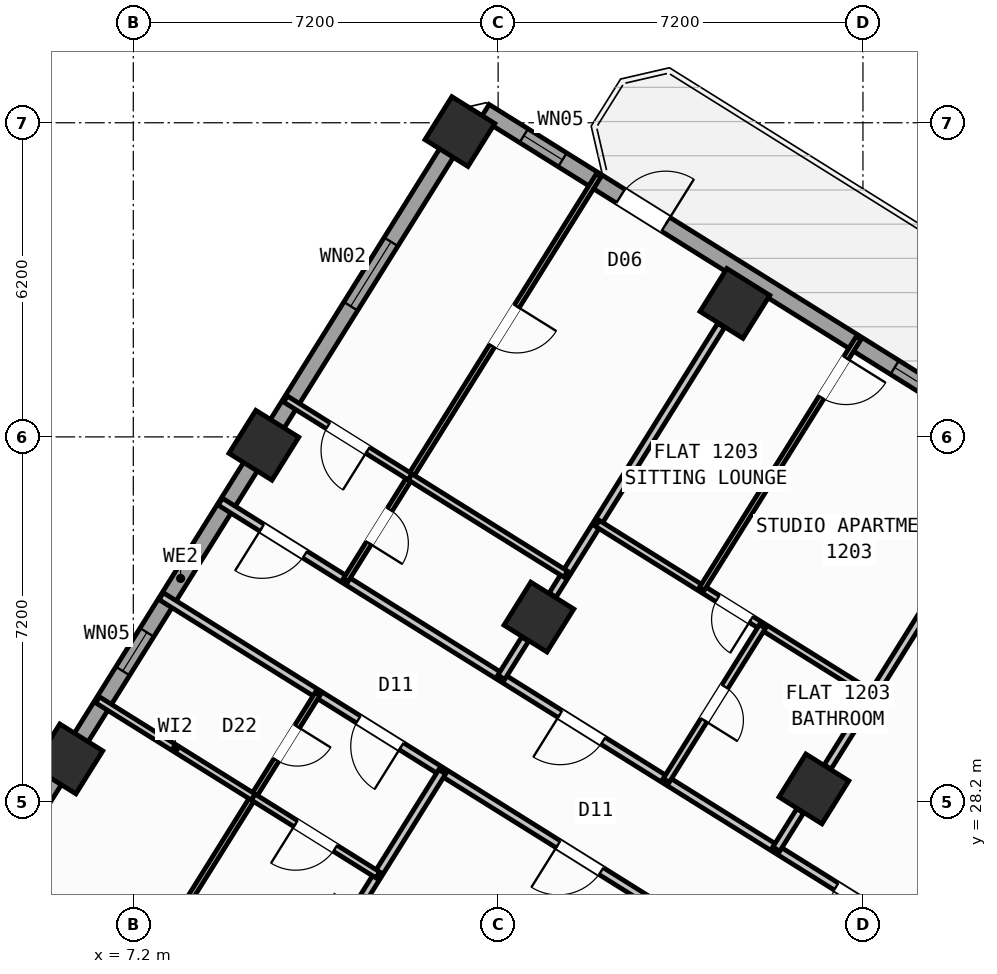
"""IFC4 building model, lengths in metres.
Left out: names, types, materials, properties, quantities, classifications, styles, units other than length and angle.
Written with IfcOpenShell. Run it as: python <this file> out.ifc"""

import sys

from ifc_helpers import new_model, si_unit, direction, frame, frame_2d, origin, origin_2d, place, context, subcontext, project, spatial, rectangle, hollow_rectangle, extrude, source, transform, mapped, element, fill, save


model = new_model("IFC4")
c1 = context("Model", 3, precision=1e-05, world=origin(), true_north=direction((0.0, 1.0)))
c2 = subcontext(c1, "Body", "Model", "MODEL_VIEW")
j1 = project(units=[si_unit("LENGTHUNIT", "METRE"), si_unit("PLANEANGLEUNIT", "RADIAN")], contexts=[c1])
p1 = place(None, origin())
s1 = spatial("IfcSite", under=j1, at=p1, CompositionType="ELEMENT")
p2 = place(p1, origin())
s2 = spatial("IfcBuilding", under=s1, at=p2, CompositionType="ELEMENT")
p3 = place(p2, frame((0.0, 0.0, 49.2)))
s3 = spatial("IfcBuildingStorey", under=s2, at=p3, CompositionType="ELEMENT", Elevation=49.2)
m1 = source(origin(), c2, "Body", "SweptSolid", [
    extrude(hollow_rectangle(XDim=1.0, YDim=1.0, WallThickness=0.04, at=origin_2d()), origin(), (0.0, 0.0, 1.0), 3.6),
])
for number, where, z_axis, x_axis in (
    (1, (20.632, 28.452, 0.0), (0.0, 0.0, 1.0), (-0.848, 0.53, 0.0)),
    (2, (19.073, 38.034, 0.0), (0.0, 0.0, 1.0), (-0.848, 0.53, 0.0)),
    (3, (15.205, 31.844, 0.0), (0.0, 0.0, 1.0), (-0.848, 0.53, 0.0)),
    (4, (13.646, 41.426, 0.0), (0.0, 0.0, 1.0), (-0.848, 0.53, 0.0)),
    (5, (9.777, 35.235, 0.0), (0.0, 0.0, 1.0), (-0.848, 0.53, 0.0)),
    (6, (5.909, 29.044, 0.0), (0.0, 0.0, 1.0), (-0.848, 0.53, 0.0)),
):
    element("IfcColumn", number, at=place(p3, frame(where, z_axis=z_axis, x_axis=x_axis)), inside=s3, PredefinedType="COLUMN", context=c2, shape_type="MappedRepresentation", body=[
        mapped(m1, transform((0.0, 0.0, 0.0), scale=1.0)),
    ])
p4 = place(p3, frame((2.415, 23.452, 0.0), z_axis=(0.0, 0.0, 1.0), x_axis=(0.52991049553, 0.848053575387, 0.0)))
e7 = element("IfcWall", 7, at=p4, inside=s3, PredefinedType="STANDARD", context=c2, shape_type="SweptSolid", body=[
    extrude(rectangle(XDim=21.587, YDim=0.32, at=frame_2d((10.794, 0.0))), origin(), (0.0, 0.0, 1.0), 2.725),
])
p5 = place(p4, frame((2.356, 0.0, 0.8)))
e8 = element("IfcOpeningElement", 8, at=p5, cuts=e7, PredefinedType="OPENING", context=c2, shape_type="SweptSolid", body=[
    extrude(rectangle(XDim=2.1, YDim=1.55, at=frame_2d((1.05, 0.775))), frame((0.0, 0.17, 0.0), z_axis=(0.0, -1.0, 0.0), x_axis=(1.0, 0.0, 0.0)), (0.0, 0.0, 1.0), 0.34),
])
p6 = place(p4, frame((8.639, 0.0, 1.0)))
e9 = element("IfcOpeningElement", 9, at=p6, cuts=e7, PredefinedType="OPENING", context=c2, shape_type="SweptSolid", body=[
    extrude(rectangle(XDim=0.9, YDim=1.25, at=frame_2d((0.45, 0.625))), frame((0.0, 0.17, 0.0), z_axis=(0.0, -1.0, 0.0), x_axis=(1.0, 0.0, 0.0)), (0.0, 0.0, 1.0), 0.34),
])
p7 = place(p4, frame((17.129, 0.0, 0.85)))
e10 = element("IfcOpeningElement", 10, at=p7, cuts=e7, PredefinedType="OPENING", context=c2, shape_type="SweptSolid", body=[
    extrude(rectangle(XDim=1.5, YDim=1.5, at=frame_2d((0.75, 0.75))), frame((0.0, 0.17, 0.0), z_axis=(0.0, -1.0, 0.0), x_axis=(1.0, 0.0, 0.0)), (0.0, 0.0, 1.0), 0.34),
])
p8 = place(p3, frame((14.138, 41.825, 0.0), z_axis=(0.0, 0.0, 1.0), x_axis=(0.848046498049, -0.529921821731, 0.0)))
e11 = element("IfcWall", 11, at=p8, inside=s3, PredefinedType="STANDARD", context=c2, shape_type="SweptSolid", body=[
    extrude(rectangle(XDim=31.588, YDim=0.32, at=frame_2d((15.794, 0.0))), origin(), (0.0, 0.0, 1.0), 3.35),
])
p9 = place(p8, frame((3.159, 0.0, 0.0)))
e12 = element("IfcOpeningElement", 12, at=p9, cuts=e11, PredefinedType="OPENING", context=c2, shape_type="SweptSolid", body=[
    extrude(rectangle(XDim=1.05, YDim=2.15, at=frame_2d((0.525, 1.075))), frame((0.0, 0.17, 0.0), z_axis=(0.0, -1.0, 0.0), x_axis=(1.0, 0.0, 0.0)), (0.0, 0.0, 1.0), 0.34),
])
p10 = place(p8, frame((0.906, 0.0, 1.0)))
e13 = element("IfcOpeningElement", 13, at=p10, cuts=e11, PredefinedType="OPENING", context=c2, shape_type="SweptSolid", body=[
    extrude(rectangle(XDim=0.9, YDim=1.25, at=frame_2d((0.45, 0.625))), frame((0.0, 0.17, 0.0), z_axis=(0.0, -1.0, 0.0), x_axis=(1.0, 0.0, 0.0)), (0.0, 0.0, 1.0), 0.34),
])
p11 = place(p8, frame((9.537, 0.0, 0.85)))
e14 = element("IfcOpeningElement", 14, at=p11, cuts=e11, PredefinedType="OPENING", context=c2, shape_type="SweptSolid", body=[
    extrude(rectangle(XDim=1.8, YDim=1.5, at=frame_2d((0.9, 0.75))), frame((0.0, 0.17, 0.0), z_axis=(0.0, -1.0, 0.0), x_axis=(1.0, 0.0, 0.0)), (0.0, 0.0, 1.0), 0.34),
])
p12 = place(p8, frame((13.899, 0.0, 0.85)))
e15 = element("IfcOpeningElement", 15, at=p12, cuts=e11, PredefinedType="OPENING", context=c2, shape_type="SweptSolid", body=[
    extrude(rectangle(XDim=1.5, YDim=1.5, at=frame_2d((0.75, 0.75))), frame((0.0, 0.17, 0.0), z_axis=(0.0, -1.0, 0.0), x_axis=(1.0, 0.0, 0.0)), (0.0, 0.0, 1.0), 0.34),
])
p13 = place(p8, frame((22.019, 0.0, 0.95)))
e16 = element("IfcOpeningElement", 16, at=p13, cuts=e11, PredefinedType="OPENING", context=c2, shape_type="SweptSolid", body=[
    extrude(rectangle(XDim=1.2, YDim=1.4, at=frame_2d((0.6, 0.7))), frame((0.0, 0.17, 0.0), z_axis=(0.0, -1.0, 0.0), x_axis=(1.0, 0.0, 0.0)), (0.0, 0.0, 1.0), 0.34),
])
p14 = place(p8, frame((27.569, 0.0, 0.95)))
e17 = element("IfcOpeningElement", 17, at=p14, cuts=e11, PredefinedType="OPENING", context=c2, shape_type="SweptSolid", body=[
    extrude(rectangle(XDim=1.2, YDim=1.4, at=frame_2d((0.6, 0.7))), frame((0.0, 0.17, 0.0), z_axis=(0.0, -1.0, 0.0), x_axis=(1.0, 0.0, 0.0)), (0.0, 0.0, 1.0), 0.34),
])
p15 = place(p3, frame((23.104, 25.256, 0.0), z_axis=(0.0, 0.0, 1.0), x_axis=(-0.848041752158, 0.529929416617, 0.0)))
e18 = element("IfcWall", 18, at=p15, inside=s3, PredefinedType="PARTITIONING", context=c2, shape_type="SweptSolid", body=[
    extrude(rectangle(XDim=16.73, YDim=0.16, at=frame_2d((8.365, 0.0))), origin(), (0.0, 0.0, 1.0), 3.34),
])
p16 = place(p15, frame((1.395, 0.0, 0.0)))
e19 = element("IfcOpeningElement", 19, at=p16, cuts=e18, PredefinedType="OPENING", context=c2, shape_type="SweptSolid", body=[
    extrude(rectangle(XDim=1.0, YDim=2.1, at=frame_2d((0.5, 1.05))), frame((0.0, 0.09, 0.0), z_axis=(0.0, -1.0, 0.0), x_axis=(1.0, 0.0, 0.0)), (0.0, 0.0, 1.0), 0.18),
])
p17 = place(p15, frame((7.82, 0.0, 0.0)))
e20 = element("IfcOpeningElement", 20, at=p17, cuts=e18, PredefinedType="OPENING", context=c2, shape_type="SweptSolid", body=[
    extrude(rectangle(XDim=1.0, YDim=2.1, at=frame_2d((0.5, 1.05))), frame((0.0, 0.09, 0.0), z_axis=(0.0, -1.0, 0.0), x_axis=(1.0, 0.0, 0.0)), (0.0, 0.0, 1.0), 0.18),
])
p18 = place(p15, frame((14.76, 0.0, 0.0)))
e21 = element("IfcOpeningElement", 21, at=p18, cuts=e18, PredefinedType="OPENING", context=c2, shape_type="SweptSolid", body=[
    extrude(rectangle(XDim=1.0, YDim=2.1, at=frame_2d((0.5, 1.05))), frame((0.0, 0.09, 0.0), z_axis=(0.0, -1.0, 0.0), x_axis=(1.0, 0.0, 0.0)), (0.0, 0.0, 1.0), 0.18),
])
p19 = place(p3, frame((21.938, 23.391, 0.0), z_axis=(0.0, 0.0, 1.0), x_axis=(-0.848045850158, 0.529922858565, 0.0)))
e22 = element("IfcWall", 22, at=p19, inside=s3, PredefinedType="PARTITIONING", context=c2, shape_type="SweptSolid", body=[
    extrude(rectangle(XDim=16.73, YDim=0.16, at=frame_2d((8.365, 0.0))), origin(), (0.0, 0.0, 1.0), 3.34),
])
p20 = place(p19, frame((2.22, 0.0, 0.0)))
e23 = element("IfcOpeningElement", 23, at=p20, cuts=e22, PredefinedType="OPENING", context=c2, shape_type="SweptSolid", body=[
    extrude(rectangle(XDim=0.86, YDim=2.05, at=frame_2d((0.43, 1.025))), frame((0.0, 0.09, 0.0), z_axis=(0.0, -1.0, 0.0), x_axis=(1.0, 0.0, 0.0)), (0.0, 0.0, 1.0), 0.18),
])
p21 = place(p19, frame((6.49, 0.0, 0.0)))
e24 = element("IfcOpeningElement", 24, at=p21, cuts=e22, PredefinedType="OPENING", context=c2, shape_type="SweptSolid", body=[
    extrude(rectangle(XDim=1.0, YDim=2.1, at=frame_2d((0.5, 1.05))), frame((0.0, 0.09, 0.0), z_axis=(0.0, -1.0, 0.0), x_axis=(1.0, 0.0, 0.0)), (0.0, 0.0, 1.0), 0.18),
])
p22 = place(p19, frame((11.14, 0.0, 0.0)))
e25 = element("IfcOpeningElement", 25, at=p22, cuts=e22, PredefinedType="OPENING", context=c2, shape_type="SweptSolid", body=[
    extrude(rectangle(XDim=1.0, YDim=2.1, at=frame_2d((0.5, 1.05))), frame((0.0, 0.09, 0.0), z_axis=(0.0, -1.0, 0.0), x_axis=(1.0, 0.0, 0.0)), (0.0, 0.0, 1.0), 0.18),
])
p23 = place(p3, frame((13.297, 28.791, 0.0), z_axis=(0.0, 0.0, 1.0), x_axis=(-0.529930102756, -0.848041323399, 0.0)))
e26 = element("IfcWall", 26, at=p23, inside=s3, PredefinedType="PARTITIONING", context=c2, shape_type="SweptSolid", body=[
    extrude(rectangle(XDim=3.188, YDim=0.16, at=frame_2d((1.594, 0.0))), origin(), (0.0, 0.0, 1.0), 2.725),
])
p24 = place(p3, frame((10.837, 30.327, 0.0), z_axis=(0.0, 0.0, 1.0), x_axis=(-0.529912148489, -0.848052542525, 0.0)))
e27 = element("IfcWall", 27, at=p24, inside=s3, PredefinedType="PARTITIONING", context=c2, shape_type="SweptSolid", body=[
    extrude(rectangle(XDim=10.62, YDim=0.11, at=frame_2d((5.31, 0.0))), origin(), (0.0, 0.0, 1.0), 3.34),
])
p25 = place(p24, frame((0.76, 0.0, 0.0)))
e28 = element("IfcOpeningElement", 28, at=p25, cuts=e27, PredefinedType="OPENING", context=c2, shape_type="SweptSolid", body=[
    extrude(rectangle(XDim=0.78, YDim=2.05, at=frame_2d((0.39, 1.025))), frame((0.0, 0.065, 0.0), z_axis=(0.0, -1.0, 0.0), x_axis=(1.0, 0.0, 0.0)), (0.0, 0.0, 1.0), 0.13),
])
p26 = place(p24, frame((6.05, 0.0, 0.0)))
e29 = element("IfcOpeningElement", 29, at=p26, cuts=e27, PredefinedType="OPENING", context=c2, shape_type="SweptSolid", body=[
    extrude(rectangle(XDim=0.92, YDim=2.08, at=frame_2d((0.46, 1.04))), frame((0.0, 0.065, 0.0), z_axis=(0.0, -1.0, 0.0), x_axis=(1.0, 0.0, 0.0)), (0.0, 0.0, 1.0), 0.13),
])
p27 = place(p3, frame((12.025, 26.755, 0.0), z_axis=(0.0, 0.0, 1.0), x_axis=(-0.848059786386, 0.529900555496, 0.0)))
e30 = element("IfcWall", 30, at=p27, inside=s3, PredefinedType="PLUMBINGWALL", context=c2, shape_type="SweptSolid", body=[
    extrude(rectangle(XDim=2.9, YDim=0.14, at=frame_2d((1.45, 0.0))), origin(), (0.0, 0.0, 1.0), 3.34),
])
p28 = place(p27, frame((0.99, 0.0, 0.0)))
e31 = element("IfcOpeningElement", 31, at=p28, cuts=e30, PredefinedType="OPENING", context=c2, shape_type="SweptSolid", body=[
    extrude(rectangle(XDim=0.92, YDim=2.08, at=frame_2d((0.46, 1.04))), frame((0.0, 0.08, 0.0), z_axis=(0.0, -1.0, 0.0), x_axis=(1.0, 0.0, 0.0)), (0.0, 0.0, 1.0), 0.16),
])
p29 = place(p3, frame((9.566, 28.292, 0.0), z_axis=(0.0, 0.0, 1.0), x_axis=(-0.848021036626, 0.529962566074, 0.0)))
e32 = element("IfcWall", 32, at=p29, inside=s3, PredefinedType="PLUMBINGWALL", context=c2, shape_type="SweptSolid", body=[
    extrude(rectangle(XDim=3.62, YDim=0.14, at=frame_2d((1.81, 0.0))), origin(), (0.0, 0.0, 1.0), 3.34),
])
p30 = place(p3, frame((24.229, 34.209, 0.0), z_axis=(0.0, 0.0, 1.0), x_axis=(-0.529897533635, -0.848061674554, 0.0)))
e33 = element("IfcWall", 33, at=p30, inside=s3, PredefinedType="PARTITIONING", context=c2, shape_type="SweptSolid", body=[
    extrude(rectangle(XDim=6.276, YDim=0.16, at=frame_2d((3.138, 0.0))), origin(), (0.0, 0.0, 1.0), 2.725),
])
p31 = place(p3, frame((20.361, 28.018, 0.0), z_axis=(0.0, 0.0, 1.0), x_axis=(-0.529900064649, -0.848060093086, 0.0)))
e34 = element("IfcWall", 34, at=p31, inside=s3, PredefinedType="PARTITIONING", context=c2, shape_type="SweptSolid", body=[
    extrude(rectangle(XDim=0.888, YDim=0.16, at=frame_2d((0.444, 0.0))), origin(), (0.0, 0.0, 1.0), 2.725),
])
p32 = place(p3, frame((18.802, 37.6, 0.0), z_axis=(0.0, 0.0, 1.0), x_axis=(-0.529915015264, -0.848050751193, 0.0)))
e35 = element("IfcWall", 35, at=p32, inside=s3, PredefinedType="PARTITIONING", context=c2, shape_type="SweptSolid", body=[
    extrude(rectangle(XDim=6.276, YDim=0.16, at=frame_2d((3.138, 0.0))), origin(), (0.0, 0.0, 1.0), 2.725),
])
p33 = place(p3, frame((14.933, 31.409, 0.0), z_axis=(0.0, 0.0, 1.0), x_axis=(-0.529776512202, -0.848137280821, 0.0)))
e36 = element("IfcWall", 36, at=p33, inside=s3, PredefinedType="PARTITIONING", context=c2, shape_type="SweptSolid", body=[
    extrude(rectangle(XDim=0.888, YDim=0.16, at=frame_2d((0.444, 0.0))), origin(), (0.0, 0.0, 1.0), 2.725),
])
p34 = place(p3, frame((21.787, 30.301, 0.0), z_axis=(0.0, 0.0, 1.0), x_axis=(-0.848049732085, 0.529916646191, 0.0)))
e37 = element("IfcWall", 37, at=p34, inside=s3, PredefinedType="PLUMBINGWALL", context=c2, shape_type="SweptSolid", body=[
    extrude(rectangle(XDim=6.4, YDim=0.14, at=frame_2d((3.2, 0.0))), origin(), (0.0, 0.0, 1.0), 3.34),
])
p35 = place(p34, frame((2.824, 0.0, 0.0)))
e38 = element("IfcOpeningElement", 38, at=p35, cuts=e37, PredefinedType="OPENING", context=c2, shape_type="SweptSolid", body=[
    extrude(rectangle(XDim=0.78, YDim=2.05, at=frame_2d((0.39, 1.025))), frame((0.0, 0.08, 0.0), z_axis=(0.0, -1.0, 0.0), x_axis=(1.0, 0.0, 0.0)), (0.0, 0.0, 1.0), 0.16),
])
p36 = place(p3, frame((19.616, 31.657, 0.0), z_axis=(0.0, 0.0, 1.0), x_axis=(-0.529876336437, -0.84807491891, 0.0)))
e39 = element("IfcWall", 39, at=p36, inside=s3, PredefinedType="PLUMBINGWALL", context=c2, shape_type="SweptSolid", body=[
    extrude(rectangle(XDim=3.58, YDim=0.14, at=frame_2d((1.79, 0.0))), origin(), (0.0, 0.0, 1.0), 3.34),
])
p37 = place(p36, frame((1.4, 0.0, 0.0)))
e40 = element("IfcOpeningElement", 40, at=p37, cuts=e39, PredefinedType="OPENING", context=c2, shape_type="SweptSolid", body=[
    extrude(rectangle(XDim=0.78, YDim=2.05, at=frame_2d((0.39, 1.025))), frame((0.0, 0.08, 0.0), z_axis=(0.0, -1.0, 0.0), x_axis=(1.0, 0.0, 0.0)), (0.0, 0.0, 1.0), 0.16),
])
p38 = place(p3, frame((21.517, 37.356, 0.0), z_axis=(0.0, 0.0, 1.0), x_axis=(-0.529916267533, -0.848049968695, 0.0)))
e41 = element("IfcWall", 41, at=p38, inside=s3, PredefinedType="PARTITIONING", context=c2, shape_type="SweptSolid", body=[
    extrude(rectangle(XDim=5.84, YDim=0.11, at=frame_2d((2.92, 0.0))), origin(), (0.0, 0.0, 1.0), 3.34),
])
p39 = place(p38, frame((0.47, 0.0, 0.0)))
e42 = element("IfcOpeningElement", 42, at=p39, cuts=e41, PredefinedType="OPENING", context=c2, shape_type="SweptSolid", body=[
    extrude(rectangle(XDim=0.92, YDim=2.08, at=frame_2d((0.46, 1.04))), frame((0.0, 0.065, 0.0), z_axis=(0.0, -1.0, 0.0), x_axis=(1.0, 0.0, 0.0)), (0.0, 0.0, 1.0), 0.13),
])
p40 = place(p3, frame((16.385, 40.563, 0.0), z_axis=(0.0, 0.0, 1.0), x_axis=(-0.529931378574, -0.848040526156, 0.0)))
e43 = element("IfcWall", 43, at=p40, inside=s3, PredefinedType="PARTITIONING", context=c2, shape_type="SweptSolid", body=[
    extrude(rectangle(XDim=9.42, YDim=0.11, at=frame_2d((4.71, 0.0))), origin(), (0.0, 0.0, 1.0), 3.34),
])
p41 = place(p40, frame((7.78, 0.0, 0.0)))
e44 = element("IfcOpeningElement", 44, at=p41, cuts=e43, PredefinedType="OPENING", context=c2, shape_type="SweptSolid", body=[
    extrude(rectangle(XDim=0.78, YDim=2.05, at=frame_2d((0.39, 1.025))), frame((0.0, 0.065, 0.0), z_axis=(0.0, -1.0, 0.0), x_axis=(1.0, 0.0, 0.0)), (0.0, 0.0, 1.0), 0.13),
])
p42 = place(p40, frame((3.05, 0.0, 0.0)))
e45 = element("IfcOpeningElement", 45, at=p42, cuts=e43, PredefinedType="OPENING", context=c2, shape_type="SweptSolid", body=[
    extrude(rectangle(XDim=0.92, YDim=2.08, at=frame_2d((0.46, 1.04))), frame((0.0, 0.065, 0.0), z_axis=(0.0, -1.0, 0.0), x_axis=(1.0, 0.0, 0.0)), (0.0, 0.0, 1.0), 0.13),
])
p43 = place(p3, frame((12.665, 34.61, 0.0), z_axis=(0.0, 0.0, 1.0), x_axis=(-0.848045593671, 0.529923269025, 0.0)))
e46 = element("IfcWall", 46, at=p43, inside=s3, PredefinedType="PLUMBINGWALL", context=c2, shape_type="SweptSolid", body=[
    extrude(rectangle(XDim=2.9, YDim=0.14, at=frame_2d((1.45, 0.0))), origin(), (0.0, 0.0, 1.0), 3.34),
])
p44 = place(p43, frame((0.99, 0.0, 0.0)))
e47 = element("IfcOpeningElement", 47, at=p44, cuts=e46, PredefinedType="OPENING", context=c2, shape_type="SweptSolid", body=[
    extrude(rectangle(XDim=0.92, YDim=2.08, at=frame_2d((0.46, 1.04))), frame((0.0, 0.08, 0.0), z_axis=(0.0, -1.0, 0.0), x_axis=(1.0, 0.0, 0.0)), (0.0, 0.0, 1.0), 0.16),
])
p45 = place(p3, frame((15.734, 32.692, 0.0), z_axis=(0.0, 0.0, 1.0), x_axis=(-0.848051346257, 0.52991406295, 0.0)))
e48 = element("IfcWall", 48, at=p45, inside=s3, PredefinedType="PLUMBINGWALL", context=c2, shape_type="SweptSolid", body=[
    extrude(rectangle(XDim=3.62, YDim=0.14, at=frame_2d((1.81, 0.0))), origin(), (0.0, 0.0, 1.0), 3.34),
])
m2 = source(origin(), c2, "Body", "SweptSolid", [
    extrude(rectangle(XDim=1.05, YDim=2.15, at=frame_2d((0.525, 1.075))), frame((0.0, 0.025, 0.0), z_axis=(0.0, -1.0, 0.0), x_axis=(1.0, 0.0, 0.0)), (0.0, 0.0, 1.0), 0.05),
])
p46 = place(p9, origin())
e49 = element("IfcDoor", 49, at=p46, inside=s3, OperationType="SINGLE_SWING_RIGHT", PredefinedType="DOOR", context=c2, shape_type="MappedRepresentation", body=[
    mapped(m2, transform((0.0, 0.0, 0.0), scale=1.0)),
])
fill(e12, e49)
m3 = source(origin(), c2, "Body", "SweptSolid", [
    extrude(rectangle(XDim=0.9, YDim=1.25, at=frame_2d((0.45, 0.625))), frame((0.0, 0.03, 0.0), z_axis=(0.0, -1.0, 0.0), x_axis=(1.0, 0.0, 0.0)), (0.0, 0.0, 1.0), 0.06),
])
p47 = place(p6, origin())
e50 = element("IfcWindow", 50, at=p47, inside=s3, PartitioningType="SINGLE_PANEL", PredefinedType="WINDOW", context=c2, shape_type="MappedRepresentation", body=[
    mapped(m3, transform((0.0, 0.0, 0.0), scale=1.0)),
])
fill(e9, e50)
m4 = source(origin(), c2, "Body", "SweptSolid", [
    extrude(rectangle(XDim=1.5, YDim=1.5, at=frame_2d((0.75, 0.75))), frame((0.0, 0.03, 0.0), z_axis=(0.0, -1.0, 0.0), x_axis=(1.0, 0.0, 0.0)), (0.0, 0.0, 1.0), 0.06),
])
p48 = place(p7, origin())
e51 = element("IfcWindow", 51, at=p48, inside=s3, PartitioningType="SINGLE_PANEL", PredefinedType="WINDOW", context=c2, shape_type="MappedRepresentation", body=[
    mapped(m4, transform((0.0, 0.0, 0.0), scale=1.0)),
])
fill(e10, e51)
p49 = place(p10, origin())
e52 = element("IfcWindow", 52, at=p49, inside=s3, PartitioningType="SINGLE_PANEL", PredefinedType="WINDOW", context=c2, shape_type="MappedRepresentation", body=[
    mapped(m3, transform((0.0, 0.0, 0.0), scale=1.0)),
])
fill(e13, e52)
m5 = source(origin(), c2, "Body", "SweptSolid", [
    extrude(rectangle(XDim=1.8, YDim=1.5, at=frame_2d((0.9, 0.75))), frame((0.0, 0.03, 0.0), z_axis=(0.0, -1.0, 0.0), x_axis=(1.0, 0.0, 0.0)), (0.0, 0.0, 1.0), 0.06),
])
p50 = place(p11, origin())
e53 = element("IfcWindow", 53, at=p50, inside=s3, PartitioningType="SINGLE_PANEL", PredefinedType="WINDOW", context=c2, shape_type="MappedRepresentation", body=[
    mapped(m5, transform((0.0, 0.0, 0.0), scale=1.0)),
])
fill(e14, e53)
m6 = source(origin(), c2, "Body", "SweptSolid", [
    extrude(rectangle(XDim=1.0, YDim=2.1, at=frame_2d((0.5, 1.05))), frame((0.0, 0.025, 0.0), z_axis=(0.0, -1.0, 0.0), x_axis=(1.0, 0.0, 0.0)), (0.0, 0.0, 1.0), 0.05),
])
p51 = place(p21, origin())
e54 = element("IfcDoor", 54, at=p51, inside=s3, OperationType="SINGLE_SWING_RIGHT", PredefinedType="DOOR", context=c2, shape_type="MappedRepresentation", body=[
    mapped(m6, transform((0.0, 0.0, 0.0), scale=1.0)),
])
fill(e24, e54)
p52 = place(p22, origin())
e55 = element("IfcDoor", 55, at=p52, inside=s3, OperationType="SINGLE_SWING_LEFT", PredefinedType="DOOR", context=c2, shape_type="MappedRepresentation", body=[
    mapped(m6, transform((0.0, 0.0, 0.0), scale=1.0)),
])
fill(e25, e55)
m7 = source(origin(), c2, "Body", "SweptSolid", [
    extrude(rectangle(XDim=0.92, YDim=2.08, at=frame_2d((0.46, 1.04))), frame((0.0, 0.025, 0.0), z_axis=(0.0, -1.0, 0.0), x_axis=(1.0, 0.0, 0.0)), (0.0, 0.0, 1.0), 0.05),
])
p53 = place(p28, origin())
e56 = element("IfcDoor", 56, at=p53, inside=s3, OperationType="SINGLE_SWING_RIGHT", PredefinedType="DOOR", context=c2, shape_type="MappedRepresentation", body=[
    mapped(m7, transform((0.0, 0.0, 0.0), scale=1.0)),
])
fill(e31, e56)
m8 = source(origin(), c2, "Body", "SweptSolid", [
    extrude(rectangle(XDim=0.78, YDim=2.05, at=frame_2d((0.39, 1.025))), frame((0.0, 0.025, 0.0), z_axis=(0.0, -1.0, 0.0), x_axis=(1.0, 0.0, 0.0)), (0.0, 0.0, 1.0), 0.05),
])
p54 = place(p25, origin())
e57 = element("IfcDoor", 57, at=p54, inside=s3, OperationType="SINGLE_SWING_LEFT", PredefinedType="DOOR", context=c2, shape_type="MappedRepresentation", body=[
    mapped(m8, transform((0.0, 0.0, 0.0), scale=1.0)),
])
fill(e28, e57)
p55 = place(p16, origin())
e58 = element("IfcDoor", 58, at=p55, inside=s3, OperationType="SINGLE_SWING_LEFT", PredefinedType="DOOR", context=c2, shape_type="MappedRepresentation", body=[
    mapped(m6, transform((0.0, 0.0, 0.0), scale=1.0)),
])
fill(e19, e58)
p56 = place(p39, origin())
e59 = element("IfcDoor", 59, at=p56, inside=s3, OperationType="SINGLE_SWING_LEFT", PredefinedType="DOOR", context=c2, shape_type="MappedRepresentation", body=[
    mapped(m7, transform((0.0, 0.0, 0.0), scale=1.0)),
])
fill(e42, e59)
p57 = place(p17, origin())
e60 = element("IfcDoor", 60, at=p57, inside=s3, OperationType="SINGLE_SWING_RIGHT", PredefinedType="DOOR", context=c2, shape_type="MappedRepresentation", body=[
    mapped(m6, transform((0.0, 0.0, 0.0), scale=1.0)),
])
fill(e20, e60)
p58 = place(p35, origin())
e61 = element("IfcDoor", 61, at=p58, inside=s3, OperationType="SINGLE_SWING_LEFT", PredefinedType="DOOR", context=c2, shape_type="MappedRepresentation", body=[
    mapped(m8, transform((0.0, 0.0, 0.0), scale=1.0)),
])
fill(e38, e61)
p59 = place(p37, origin())
e62 = element("IfcDoor", 62, at=p59, inside=s3, OperationType="SINGLE_SWING_RIGHT", PredefinedType="DOOR", context=c2, shape_type="MappedRepresentation", body=[
    mapped(m8, transform((0.0, 0.0, 0.0), scale=1.0)),
])
fill(e40, e62)
p60 = place(p18, origin())
e63 = element("IfcDoor", 63, at=p60, inside=s3, OperationType="SINGLE_SWING_RIGHT", PredefinedType="DOOR", context=c2, shape_type="MappedRepresentation", body=[
    mapped(m6, transform((0.0, 0.0, 0.0), scale=1.0)),
])
fill(e21, e63)
p61 = place(p44, origin())
e64 = element("IfcDoor", 64, at=p61, inside=s3, OperationType="SINGLE_SWING_LEFT", PredefinedType="DOOR", context=c2, shape_type="MappedRepresentation", body=[
    mapped(m7, transform((0.0, 0.0, 0.0), scale=1.0)),
])
fill(e47, e64)
p62 = place(p41, origin())
e65 = element("IfcDoor", 65, at=p62, inside=s3, OperationType="SINGLE_SWING_RIGHT", PredefinedType="DOOR", context=c2, shape_type="MappedRepresentation", body=[
    mapped(m8, transform((0.0, 0.0, 0.0), scale=1.0)),
])
fill(e44, e65)
p63 = place(p42, origin())
e66 = element("IfcDoor", 66, at=p63, inside=s3, OperationType="SINGLE_SWING_LEFT", PredefinedType="DOOR", context=c2, shape_type="MappedRepresentation", body=[
    mapped(m7, transform((0.0, 0.0, 0.0), scale=1.0)),
])
fill(e45, e66)
save(model, sys.argv[1])
